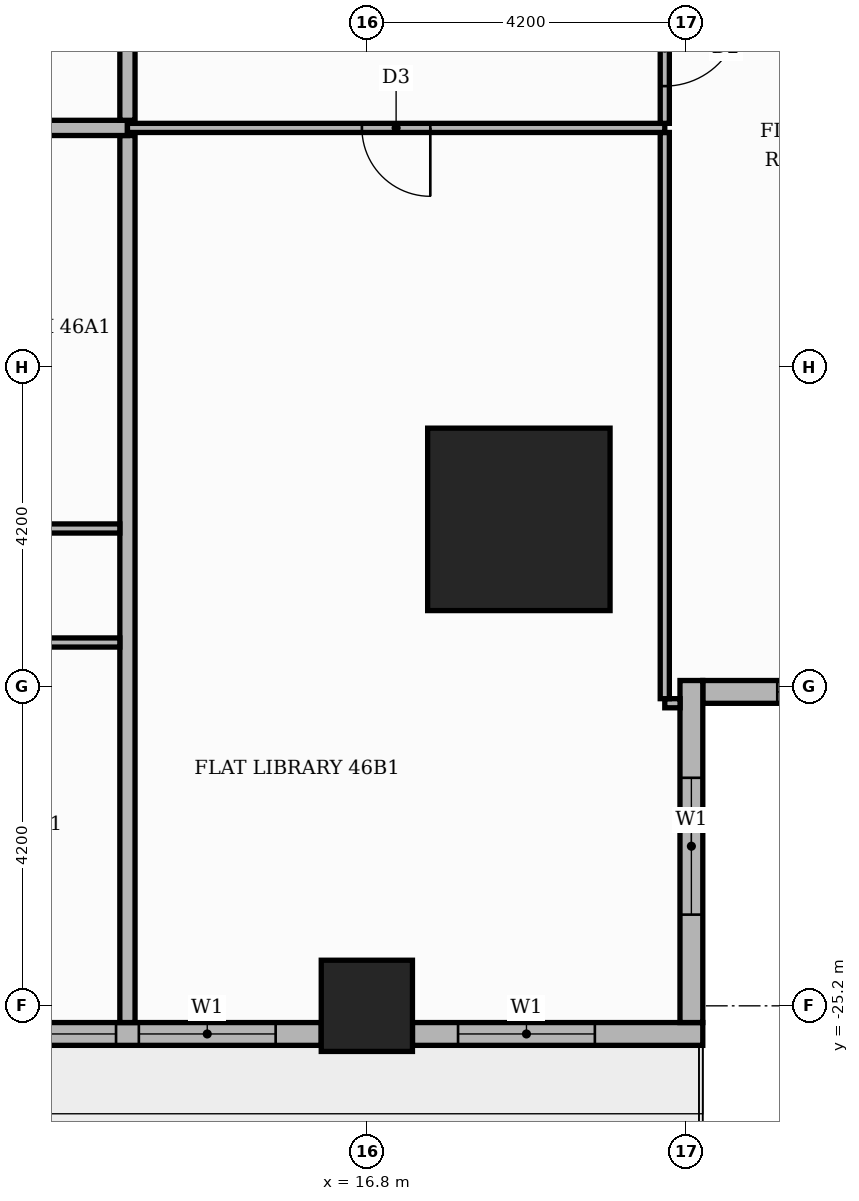
"""IFC4 building model, lengths in metres.
Left out: names, types, materials, properties, quantities, classifications, styles, units other than length and angle.
Written with IfcOpenShell. Run it as: python <this file> out.ifc"""

import sys

from ifc_helpers import new_model, si_unit, direction, frame, frame_2d, origin, origin_2d, place, context, subcontext, project, spatial, rectangle, extrude, element, fill, save


model = new_model("IFC4")
c1 = context("Model", 3, precision=1e-05, world=origin(), true_north=direction((0.0, 1.0)))
c2 = subcontext(c1, "Body", "Model", "MODEL_VIEW")
j1 = project(units=[si_unit("LENGTHUNIT", "METRE"), si_unit("PLANEANGLEUNIT", "RADIAN")], contexts=[c1])
p1 = place(None, origin())
s1 = spatial("IfcSite", under=j1, at=p1, CompositionType="ELEMENT")
p2 = place(p1, origin())
s2 = spatial("IfcBuilding", under=s1, at=p2, CompositionType="ELEMENT")
p3 = place(p2, frame((0.0, 0.0, 196.2)))
s3 = spatial("IfcBuildingStorey", under=s2, at=p3, CompositionType="ELEMENT", Elevation=196.2)
p4 = place(p3, frame((18.8, -18.8, 0.0), z_axis=(0.0, 0.0, 1.0), x_axis=(1.0, 0.0, 0.0)))
e1 = element("IfcColumn", 1, at=p4, inside=s3, PredefinedType="COLUMN", context=c2, shape_type="SweptSolid", body=[
    extrude(rectangle(XDim=2.4, YDim=2.4, at=origin_2d()), origin(), (0.0, 0.0, 1.0), 3.9),
])
p5 = place(p3, frame((16.8, -25.2, 0.0), z_axis=(0.0, 0.0, 1.0), x_axis=(1.0, 0.0, 0.0)))
e2 = element("IfcColumn", 2, at=p5, inside=s3, PredefinedType="COLUMN", context=c2, shape_type="SweptSolid", body=[
    extrude(rectangle(XDim=1.2, YDim=1.2, at=origin_2d()), origin(), (0.0, 0.0, 1.0), 3.9),
])
p6 = place(p3, frame((21.22, -21.07, 0.0), z_axis=(0.0, 0.0, 1.0), x_axis=(1.0, 0.0, 0.0)))
e3 = element("IfcWall", 3, at=p6, inside=s3, PredefinedType="STANDARD", context=c2, shape_type="SweptSolid", body=[
    extrude(rectangle(XDim=4.5, YDim=0.3, at=frame_2d((2.25, 0.0))), origin(), (0.0, 0.0, 1.0), 3.48),
])
p7 = place(p6, frame((0.98, 0.0, 0.9)))
e4 = element("IfcOpeningElement", 4, at=p7, cuts=e3, PredefinedType="OPENING", context=c2, shape_type="SweptSolid", body=[
    extrude(rectangle(XDim=1.8, YDim=2.1, at=frame_2d((0.9, 1.05))), frame((0.0, 0.16, 0.0), z_axis=(0.0, -1.0, 0.0), x_axis=(1.0, 0.0, 0.0)), (0.0, 0.0, 1.0), 0.32),
])
p8 = place(p3, frame((9.0, -25.57, 0.0), z_axis=(0.0, 0.0, 1.0), x_axis=(1.0, 0.0, 0.0)))
e5 = element("IfcWall", 5, at=p8, inside=s3, PredefinedType="STANDARD", context=c2, shape_type="SweptSolid", body=[
    extrude(rectangle(XDim=7.2, YDim=0.3, at=frame_2d((3.6, 0.0))), origin(), (0.0, 0.0, 1.0), 3.48),
])
p9 = place(p8, frame((0.6, 0.0, 0.9)))
e6 = element("IfcOpeningElement", 6, at=p9, cuts=e5, PredefinedType="OPENING", context=c2, shape_type="SweptSolid", body=[
    extrude(rectangle(XDim=3.9, YDim=2.1, at=frame_2d((1.95, 1.05))), frame((0.0, 0.16, 0.0), z_axis=(0.0, -1.0, 0.0), x_axis=(1.0, 0.0, 0.0)), (0.0, 0.0, 1.0), 0.32),
])
p10 = place(p8, frame((4.8, 0.0, 0.9)))
e7 = element("IfcOpeningElement", 7, at=p10, cuts=e5, PredefinedType="OPENING", context=c2, shape_type="SweptSolid", body=[
    extrude(rectangle(XDim=1.8, YDim=2.1, at=frame_2d((0.9, 1.05))), frame((0.0, 0.16, 0.0), z_axis=(0.0, -1.0, 0.0), x_axis=(1.0, 0.0, 0.0)), (0.0, 0.0, 1.0), 0.32),
])
p11 = place(p3, frame((17.4, -25.57, 0.0), z_axis=(0.0, 0.0, 1.0), x_axis=(1.0, 0.0, 0.0)))
e8 = element("IfcWall", 8, at=p11, inside=s3, PredefinedType="STANDARD", context=c2, shape_type="SweptSolid", body=[
    extrude(rectangle(XDim=3.82, YDim=0.3, at=frame_2d((1.91, 0.0))), origin(), (0.0, 0.0, 1.0), 3.48),
])
p12 = place(p11, frame((0.6, 0.0, 0.9)))
e9 = element("IfcOpeningElement", 9, at=p12, cuts=e8, PredefinedType="OPENING", context=c2, shape_type="SweptSolid", body=[
    extrude(rectangle(XDim=1.8, YDim=2.1, at=frame_2d((0.9, 1.05))), frame((0.0, 0.16, 0.0), z_axis=(0.0, -1.0, 0.0), x_axis=(1.0, 0.0, 0.0)), (0.0, 0.0, 1.0), 0.32),
])
p13 = place(p3, frame((21.07, -25.42, 0.0), z_axis=(0.0, 0.0, 1.0), x_axis=(0.0, 1.0, 0.0)))
e10 = element("IfcWall", 10, at=p13, inside=s3, PredefinedType="STANDARD", context=c2, shape_type="SweptSolid", body=[
    extrude(rectangle(XDim=4.5, YDim=0.3, at=frame_2d((2.25, 0.0))), origin(), (0.0, 0.0, 1.0), 3.48),
])
p14 = place(p13, frame((1.42, 0.0, 0.9)))
e11 = element("IfcOpeningElement", 11, at=p14, cuts=e10, PredefinedType="OPENING", context=c2, shape_type="SweptSolid", body=[
    extrude(rectangle(XDim=1.8, YDim=2.1, at=frame_2d((0.9, 1.05))), frame((0.0, 0.16, 0.0), z_axis=(0.0, -1.0, 0.0), x_axis=(1.0, 0.0, 0.0)), (0.0, 0.0, 1.0), 0.32),
])
p15 = place(p3, frame((13.65, -25.42, 0.0), z_axis=(0.0, 0.0, 1.0), x_axis=(0.0, 1.0, 0.0)))
e12 = element("IfcWall", 12, at=p15, inside=s3, PredefinedType="PARTITIONING", context=c2, shape_type="SweptSolid", body=[
    extrude(rectangle(XDim=11.67, YDim=0.2, at=frame_2d((5.835, 0.0))), origin(), (0.0, 0.0, 1.0), 3.48),
])
p16 = place(p3, frame((20.72, -21.219, 0.0), z_axis=(0.0, 0.0, 1.0), x_axis=(1.0, 0.0, 0.0)))
e13 = element("IfcWall", 13, at=p16, inside=s3, PredefinedType="PARTITIONING", context=c2, shape_type="SweptSolid", body=[
    extrude(rectangle(XDim=0.201, YDim=0.12, at=frame_2d((0.101, 0.0))), origin(), (0.0, 0.0, 1.0), 3.48),
])
p17 = place(p3, frame((20.72, -21.159, 0.0), z_axis=(0.0, 0.0, 1.0), x_axis=(0.0, 1.0, 0.0)))
e14 = element("IfcWall", 14, at=p17, inside=s3, PredefinedType="PARTITIONING", context=c2, shape_type="SweptSolid", body=[
    extrude(rectangle(XDim=7.449, YDim=0.12, at=frame_2d((3.725, 0.0))), origin(), (0.0, 0.0, 1.0), 3.48),
])
p18 = place(p3, frame((-21.219, -20.42, 0.0), z_axis=(0.0, 0.0, 1.0), x_axis=(1.0, 0.0, 0.0)))
e15 = element("IfcWall", 15, at=p18, inside=s3, PredefinedType="PARTITIONING", context=c2, shape_type="SweptSolid", body=[
    extrude(rectangle(XDim=34.769, YDim=0.12, at=frame_2d((17.385, 0.0))), origin(), (0.0, 0.0, 1.0), 3.48),
])
p19 = place(p18, frame((8.119, 0.0, 0.0)))
e16 = element("IfcOpeningElement", 16, at=p19, cuts=e15, PredefinedType="OPENING", context=c2, shape_type="SweptSolid", body=[
    extrude(rectangle(XDim=1.0, YDim=2.1, at=frame_2d((0.5, 1.05))), frame((0.0, 0.07, 0.0), z_axis=(0.0, -1.0, 0.0), x_axis=(1.0, 0.0, 0.0)), (0.0, 0.0, 1.0), 0.14),
])
p20 = place(p18, frame((13.419, 0.0, 0.0)))
e17 = element("IfcOpeningElement", 17, at=p20, cuts=e15, PredefinedType="OPENING", context=c2, shape_type="SweptSolid", body=[
    extrude(rectangle(XDim=0.9, YDim=2.1, at=frame_2d((0.45, 1.05))), frame((0.0, 0.07, 0.0), z_axis=(0.0, -1.0, 0.0), x_axis=(1.0, 0.0, 0.0)), (0.0, 0.0, 1.0), 0.14),
])
p21 = place(p18, frame((23.919, 0.0, 0.0)))
e18 = element("IfcOpeningElement", 18, at=p21, cuts=e15, PredefinedType="OPENING", context=c2, shape_type="SweptSolid", body=[
    extrude(rectangle(XDim=0.9, YDim=2.1, at=frame_2d((0.45, 1.05))), frame((0.0, 0.07, 0.0), z_axis=(0.0, -1.0, 0.0), x_axis=(1.0, 0.0, 0.0)), (0.0, 0.0, 1.0), 0.14),
])
p22 = place(p18, frame((31.269, 0.0, 0.0)))
e19 = element("IfcOpeningElement", 19, at=p22, cuts=e15, PredefinedType="OPENING", context=c2, shape_type="SweptSolid", body=[
    extrude(rectangle(XDim=0.9, YDim=2.1, at=frame_2d((0.45, 1.05))), frame((0.0, 0.07, 0.0), z_axis=(0.0, -1.0, 0.0), x_axis=(1.0, 0.0, 0.0)), (0.0, 0.0, 1.0), 0.14),
])
p23 = place(p3, frame((-7.35, -18.92, 0.0), z_axis=(0.0, 0.0, 1.0), x_axis=(1.0, 0.0, 0.0)))
e20 = element("IfcWall", 20, at=p23, inside=s3, PredefinedType="PARTITIONING", context=c2, shape_type="SweptSolid", body=[
    extrude(rectangle(XDim=20.9, YDim=0.12, at=frame_2d((10.45, 0.0))), origin(), (0.0, 0.0, 1.0), 3.48),
])
p24 = place(p23, frame((2.55, 0.0, 0.0)))
e21 = element("IfcOpeningElement", 21, at=p24, cuts=e20, PredefinedType="OPENING", context=c2, shape_type="SweptSolid", body=[
    extrude(rectangle(XDim=0.9, YDim=2.1, at=frame_2d((0.45, 1.05))), frame((0.0, 0.07, 0.0), z_axis=(0.0, -1.0, 0.0), x_axis=(1.0, 0.0, 0.0)), (0.0, 0.0, 1.0), 0.14),
])
p25 = place(p23, frame((7.5, 0.0, 0.0)))
e22 = element("IfcOpeningElement", 22, at=p25, cuts=e20, PredefinedType="OPENING", context=c2, shape_type="SweptSolid", body=[
    extrude(rectangle(XDim=0.9, YDim=2.1, at=frame_2d((0.45, 1.05))), frame((0.0, 0.07, 0.0), z_axis=(0.0, -1.0, 0.0), x_axis=(1.0, 0.0, 0.0)), (0.0, 0.0, 1.0), 0.14),
])
p26 = place(p23, frame((10.8, 0.0, 0.0)))
e23 = element("IfcOpeningElement", 23, at=p26, cuts=e20, PredefinedType="OPENING", context=c2, shape_type="SweptSolid", body=[
    extrude(rectangle(XDim=0.9, YDim=2.1, at=frame_2d((0.45, 1.05))), frame((0.0, 0.07, 0.0), z_axis=(0.0, -1.0, 0.0), x_axis=(1.0, 0.0, 0.0)), (0.0, 0.0, 1.0), 0.14),
])
p27 = place(p23, frame((13.275, 0.0, 0.0)))
e24 = element("IfcOpeningElement", 24, at=p27, cuts=e20, PredefinedType="OPENING", context=c2, shape_type="SweptSolid", body=[
    extrude(rectangle(XDim=0.9, YDim=2.1, at=frame_2d((0.45, 1.05))), frame((0.0, 0.07, 0.0), z_axis=(0.0, -1.0, 0.0), x_axis=(1.0, 0.0, 0.0)), (0.0, 0.0, 1.0), 0.14),
])
p28 = place(p23, frame((15.3, 0.0, 0.0)))
e25 = element("IfcOpeningElement", 25, at=p28, cuts=e20, PredefinedType="OPENING", context=c2, shape_type="SweptSolid", body=[
    extrude(rectangle(XDim=0.9, YDim=2.1, at=frame_2d((0.45, 1.05))), frame((0.0, 0.07, 0.0), z_axis=(0.0, -1.0, 0.0), x_axis=(1.0, 0.0, 0.0)), (0.0, 0.0, 1.0), 0.14),
])
p29 = place(p23, frame((18.375, 0.0, 0.0)))
e26 = element("IfcOpeningElement", 26, at=p29, cuts=e20, PredefinedType="OPENING", context=c2, shape_type="SweptSolid", body=[
    extrude(rectangle(XDim=0.9, YDim=2.1, at=frame_2d((0.45, 1.05))), frame((0.0, 0.07, 0.0), z_axis=(0.0, -1.0, 0.0), x_axis=(1.0, 0.0, 0.0)), (0.0, 0.0, 1.0), 0.14),
])
p30 = place(p3, frame((-25.42, -13.65, 0.0), z_axis=(0.0, 0.0, 1.0), x_axis=(1.0, 0.0, 0.0)))
e27 = element("IfcWall", 27, at=p30, inside=s3, PredefinedType="PARTITIONING", context=c2, shape_type="SweptSolid", body=[
    extrude(rectangle(XDim=39.07, YDim=0.2, at=frame_2d((19.535, 0.0))), origin(), (0.0, 0.0, 1.0), 3.48),
])
p31 = place(p30, frame((14.37, 0.0, 0.0)))
e28 = element("IfcOpeningElement", 28, at=p31, cuts=e27, PredefinedType="OPENING", context=c2, shape_type="SweptSolid", body=[
    extrude(rectangle(XDim=1.1, YDim=2.4, at=frame_2d((0.55, 1.2))), frame((0.0, 0.11, 0.0), z_axis=(0.0, -1.0, 0.0), x_axis=(1.0, 0.0, 0.0)), (0.0, 0.0, 1.0), 0.22),
])
p32 = place(p3, frame((13.65, -13.65, 0.0), z_axis=(0.0, 0.0, 1.0), x_axis=(1.0, 0.0, 0.0)))
e29 = element("IfcWall", 29, at=p32, inside=s3, PredefinedType="PARTITIONING", context=c2, shape_type="SweptSolid", body=[
    extrude(rectangle(XDim=7.07, YDim=0.12, at=frame_2d((3.535, 0.0))), origin(), (0.0, 0.0, 1.0), 3.48),
])
p33 = place(p32, frame((3.085, 0.0, 0.0)))
e30 = element("IfcOpeningElement", 30, at=p33, cuts=e29, PredefinedType="OPENING", context=c2, shape_type="SweptSolid", body=[
    extrude(rectangle(XDim=0.9, YDim=2.1, at=frame_2d((0.45, 1.05))), frame((0.0, 0.07, 0.0), z_axis=(0.0, -1.0, 0.0), x_axis=(1.0, 0.0, 0.0)), (0.0, 0.0, 1.0), 0.14),
])
p34 = place(p3, frame((20.72, -13.59, 0.0), z_axis=(0.0, 0.0, 1.0), x_axis=(0.0, 1.0, 0.0)))
e31 = element("IfcWall", 31, at=p34, inside=s3, PredefinedType="PARTITIONING", context=c2, shape_type="SweptSolid", body=[
    extrude(rectangle(XDim=1.98, YDim=0.12, at=frame_2d((0.99, 0.0))), origin(), (0.0, 0.0, 1.0), 3.48),
])
p35 = place(p34, frame((0.49, 0.0, 0.0)))
e32 = element("IfcOpeningElement", 32, at=p35, cuts=e31, PredefinedType="OPENING", context=c2, shape_type="SweptSolid", body=[
    extrude(rectangle(XDim=1.0, YDim=2.1, at=frame_2d((0.5, 1.05))), frame((0.0, 0.07, 0.0), z_axis=(0.0, -1.0, 0.0), x_axis=(1.0, 0.0, 0.0)), (0.0, 0.0, 1.0), 0.14),
])
p36 = place(p3, frame((13.65, -13.55, 0.0), z_axis=(0.0, 0.0, 1.0), x_axis=(0.0, 1.0, 0.0)))
e33 = element("IfcWall", 33, at=p36, inside=s3, PredefinedType="PARTITIONING", context=c2, shape_type="SweptSolid", body=[
    extrude(rectangle(XDim=2.45, YDim=0.2, at=frame_2d((1.225, 0.0))), origin(), (0.0, 0.0, 1.0), 3.48),
])
p37 = place(p7, origin())
e34 = element("IfcWindow", 34, at=p37, inside=s3, PartitioningType="SINGLE_PANEL", PredefinedType="WINDOW", context=c2, shape_type="SweptSolid", body=[
    extrude(rectangle(XDim=1.8, YDim=2.1, at=frame_2d((0.9, 1.05))), frame((0.0, 0.03, 0.0), z_axis=(0.0, -1.0, 0.0), x_axis=(1.0, 0.0, 0.0)), (0.0, 0.0, 1.0), 0.06),
])
fill(e4, e34)
p38 = place(p9, origin())
e35 = element("IfcWindow", 35, at=p38, inside=s3, PartitioningType="SINGLE_PANEL", PredefinedType="WINDOW", context=c2, shape_type="SweptSolid", body=[
    extrude(rectangle(XDim=3.9, YDim=2.1, at=frame_2d((1.95, 1.05))), frame((0.0, 0.03, 0.0), z_axis=(0.0, -1.0, 0.0), x_axis=(1.0, 0.0, 0.0)), (0.0, 0.0, 1.0), 0.06),
])
fill(e6, e35)
p39 = place(p10, origin())
e36 = element("IfcWindow", 36, at=p39, inside=s3, PartitioningType="SINGLE_PANEL", PredefinedType="WINDOW", context=c2, shape_type="SweptSolid", body=[
    extrude(rectangle(XDim=1.8, YDim=2.1, at=frame_2d((0.9, 1.05))), frame((0.0, 0.03, 0.0), z_axis=(0.0, -1.0, 0.0), x_axis=(1.0, 0.0, 0.0)), (0.0, 0.0, 1.0), 0.06),
])
fill(e7, e36)
p40 = place(p12, origin())
e37 = element("IfcWindow", 37, at=p40, inside=s3, PartitioningType="SINGLE_PANEL", PredefinedType="WINDOW", context=c2, shape_type="SweptSolid", body=[
    extrude(rectangle(XDim=1.8, YDim=2.1, at=frame_2d((0.9, 1.05))), frame((0.0, 0.03, 0.0), z_axis=(0.0, -1.0, 0.0), x_axis=(1.0, 0.0, 0.0)), (0.0, 0.0, 1.0), 0.06),
])
fill(e9, e37)
p41 = place(p14, origin())
e38 = element("IfcWindow", 38, at=p41, inside=s3, PartitioningType="SINGLE_PANEL", PredefinedType="WINDOW", context=c2, shape_type="SweptSolid", body=[
    extrude(rectangle(XDim=1.8, YDim=2.1, at=frame_2d((0.9, 1.05))), frame((0.0, 0.03, 0.0), z_axis=(0.0, -1.0, 0.0), x_axis=(1.0, 0.0, 0.0)), (0.0, 0.0, 1.0), 0.06),
])
fill(e11, e38)
p42 = place(p33, frame((0.9, 0.0, 0.0), z_axis=(0.0, 0.0, 1.0), x_axis=(-1.0, 0.0, 0.0)))
e39 = element("IfcDoor", 39, at=p42, inside=s3, OperationType="SINGLE_SWING_RIGHT", PredefinedType="DOOR", context=c2, shape_type="SweptSolid", body=[
    extrude(rectangle(XDim=0.9, YDim=2.1, at=frame_2d((0.45, 1.05))), frame((0.0, 0.025, 0.0), z_axis=(0.0, -1.0, 0.0), x_axis=(1.0, 0.0, 0.0)), (0.0, 0.0, 1.0), 0.05),
])
fill(e30, e39)
p43 = place(p35, frame((1.0, 0.0, 0.0), z_axis=(0.0, 0.0, 1.0), x_axis=(-1.0, 0.0, 0.0)))
e40 = element("IfcDoor", 40, at=p43, inside=s3, OperationType="SINGLE_SWING_RIGHT", PredefinedType="DOOR", context=c2, shape_type="SweptSolid", body=[
    extrude(rectangle(XDim=1.0, YDim=2.1, at=frame_2d((0.5, 1.05))), frame((0.0, 0.025, 0.0), z_axis=(0.0, -1.0, 0.0), x_axis=(1.0, 0.0, 0.0)), (0.0, 0.0, 1.0), 0.05),
])
fill(e32, e40)
save(model, sys.argv[1])
